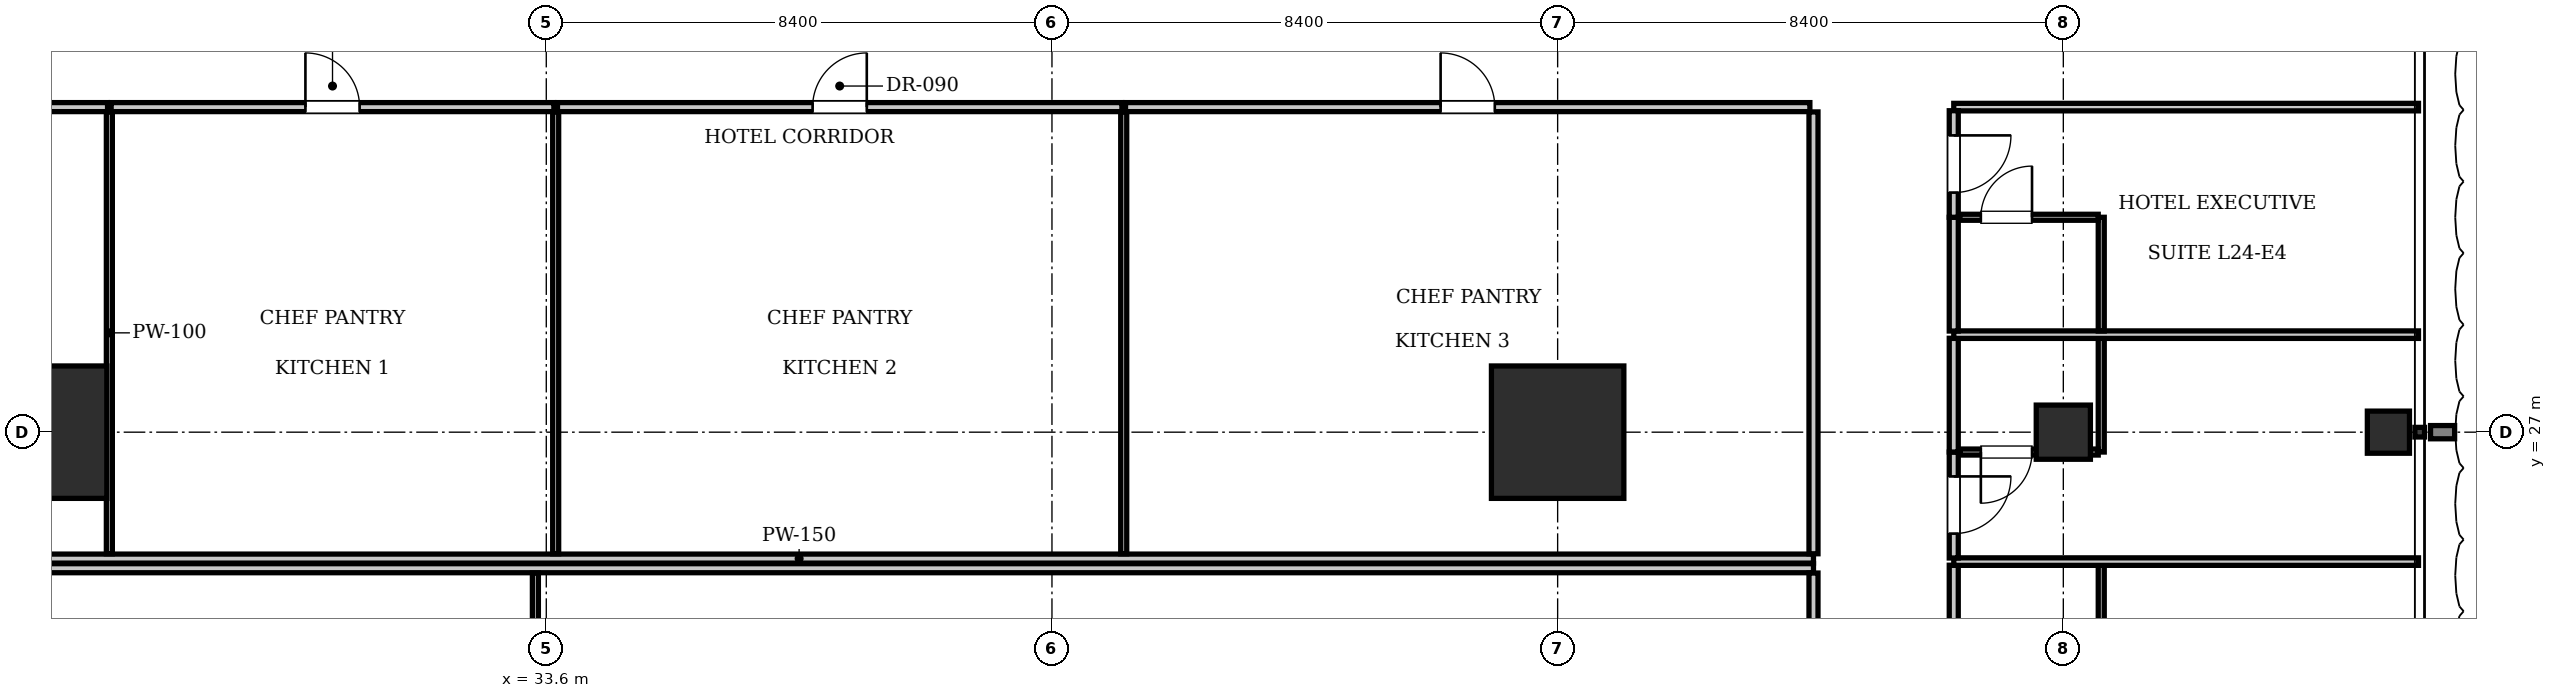
"""IFC4 building model, lengths in metres.
Left out: names, types, materials, properties, quantities, classifications, styles, units other than length and angle.
Written with IfcOpenShell. Run it as: python <this file> out.ifc"""

import sys

from ifc_helpers import new_model, si_unit, direction, frame, frame_2d, origin, origin_2d, place, context, subcontext, project, spatial, rectangle, i_section, extrude, element, fill, save


model = new_model("IFC4")
c1 = context("Model", 3, precision=1e-05, world=origin(), true_north=direction((0.0, 1.0)))
c2 = subcontext(c1, "Body", "Model", "MODEL_VIEW")
j1 = project(units=[si_unit("LENGTHUNIT", "METRE"), si_unit("PLANEANGLEUNIT", "RADIAN")], contexts=[c1])
p1 = place(None, origin())
s1 = spatial("IfcSite", under=j1, at=p1, CompositionType="ELEMENT")
p2 = place(p1, origin())
s2 = spatial("IfcBuilding", under=s1, at=p2, CompositionType="ELEMENT")
p3 = place(p2, frame((0.0, 0.0, 100.1)))
s3 = spatial("IfcBuildingStorey", under=s2, at=p3, CompositionType="ELEMENT", Elevation=100.1)
for number, where, z_axis, x_axis in (
    (1, (25.2, 27.0, 0.0), (0.0, 0.0, 1.0), (1.0, 0.0, 0.0)),
    (2, (50.4, 27.0, 0.0), (0.0, 0.0, 1.0), (1.0, 0.0, 0.0)),
):
    element("IfcColumn", number, at=place(p3, frame(where, z_axis=z_axis, x_axis=x_axis)), inside=s3, PredefinedType="COLUMN", context=c2, shape_type="SweptSolid", body=[
        extrude(rectangle(XDim=2.2, YDim=2.2, at=origin_2d()), origin(), (0.0, 0.0, 1.0), 3.85),
    ])
p4 = place(p3, frame((58.8, 27.0, 0.0), z_axis=(0.0, 0.0, 1.0), x_axis=(1.0, 0.0, 0.0)))
e3 = element("IfcColumn", 3, at=p4, inside=s3, PredefinedType="COLUMN", context=c2, shape_type="SweptSolid", body=[
    extrude(rectangle(XDim=0.9, YDim=0.9, at=origin_2d()), origin(), (0.0, 0.0, 1.0), 3.85),
])
p5 = place(p3, frame((64.2, 27.0, 0.0), z_axis=(0.0, 0.0, 1.0), x_axis=(1.0, 0.0, 0.0)))
e4 = element("IfcColumn", 4, at=p5, inside=s3, PredefinedType="COLUMN", context=c2, shape_type="SweptSolid", body=[
    extrude(i_section(OverallWidth=0.7, OverallDepth=0.7, WebThickness=0.028, FlangeThickness=0.044, at=origin_2d()), origin(), (0.0, 0.0, 1.0), 3.85),
])
p6 = place(p3, frame((20.95, 24.9, 0.0), z_axis=(0.0, 0.0, 1.0), x_axis=(1.0, 0.0, 0.0)))
e5 = element("IfcWall", 5, at=p6, inside=s3, PredefinedType="PARTITIONING", context=c2, shape_type="SweptSolid", body=[
    extrude(rectangle(XDim=33.7, YDim=0.15, at=frame_2d((16.85, 0.0))), origin(), (0.0, 0.0, 1.0), 3.61),
])
p7 = place(p3, frame((54.65, 24.98, 0.0), z_axis=(0.0, 0.0, 1.0), x_axis=(0.0, 1.0, 0.0)))
e6 = element("IfcWall", 6, at=p7, inside=s3, PredefinedType="PARTITIONING", context=c2, shape_type="SweptSolid", body=[
    extrude(rectangle(XDim=7.34, YDim=0.15, at=frame_2d((3.67, 0.0))), origin(), (0.0, 0.0, 1.0), 3.293),
])
p8 = place(p3, frame((21.01, 32.4, 0.0), z_axis=(0.0, 0.0, 1.0), x_axis=(1.0, 0.0, 0.0)))
e7 = element("IfcWall", 7, at=p8, inside=s3, PredefinedType="PARTITIONING", context=c2, shape_type="SweptSolid", body=[
    extrude(rectangle(XDim=5.302, YDim=0.15, at=frame_2d((2.651, 0.0))), origin(), (0.0, 0.0, 1.0), 3.61),
])
p9 = place(p8, frame((2.201, 0.0, 0.0)))
e8 = element("IfcOpeningElement", 8, at=p9, cuts=e7, PredefinedType="OPENING", context=c2, shape_type="SweptSolid", body=[
    extrude(rectangle(XDim=0.9, YDim=2.1, at=frame_2d((0.45, 1.05))), frame((0.0, 0.085, 0.0), z_axis=(0.0, -1.0, 0.0), x_axis=(1.0, 0.0, 0.0)), (0.0, 0.0, 1.0), 0.17),
])
p10 = place(p3, frame((26.342, 24.98, 0.0), z_axis=(0.0, 0.0, 1.0), x_axis=(0.0, 1.0, 0.0)))
e9 = element("IfcWall", 9, at=p10, inside=s3, PredefinedType="PARTITIONING", context=c2, shape_type="SweptSolid", body=[
    extrude(rectangle(XDim=7.34, YDim=0.1, at=frame_2d((3.67, 0.0))), origin(), (0.0, 0.0, 1.0), 3.61),
])
p11 = place(p3, frame((26.372, 32.4, 0.0), z_axis=(0.0, 0.0, 1.0), x_axis=(1.0, 0.0, 0.0)))
e10 = element("IfcWall", 10, at=p11, inside=s3, PredefinedType="PARTITIONING", context=c2, shape_type="SweptSolid", body=[
    extrude(rectangle(XDim=7.354, YDim=0.15, at=frame_2d((3.677, 0.0))), origin(), (0.0, 0.0, 1.0), 3.61),
])
p12 = place(p11, frame((3.227, 0.0, 0.0)))
e11 = element("IfcOpeningElement", 11, at=p12, cuts=e10, PredefinedType="OPENING", context=c2, shape_type="SweptSolid", body=[
    extrude(rectangle(XDim=0.9, YDim=2.1, at=frame_2d((0.45, 1.05))), frame((0.0, 0.085, 0.0), z_axis=(0.0, -1.0, 0.0), x_axis=(1.0, 0.0, 0.0)), (0.0, 0.0, 1.0), 0.17),
])
p13 = place(p3, frame((33.756, 24.98, 0.0), z_axis=(0.0, 0.0, 1.0), x_axis=(0.0, 1.0, 0.0)))
e12 = element("IfcWall", 12, at=p13, inside=s3, PredefinedType="PARTITIONING", context=c2, shape_type="SweptSolid", body=[
    extrude(rectangle(XDim=7.34, YDim=0.1, at=frame_2d((3.67, 0.0))), origin(), (0.0, 0.0, 1.0), 2.999),
])
p14 = place(p3, frame((33.786, 32.4, 0.0), z_axis=(0.0, 0.0, 1.0), x_axis=(1.0, 0.0, 0.0)))
e13 = element("IfcWall", 13, at=p14, inside=s3, PredefinedType="PARTITIONING", context=c2, shape_type="SweptSolid", body=[
    extrude(rectangle(XDim=9.376, YDim=0.15, at=frame_2d((4.688, 0.0))), origin(), (0.0, 0.0, 1.0), 3.61),
])
p15 = place(p14, frame((4.238, 0.0, 0.0)))
e14 = element("IfcOpeningElement", 14, at=p15, cuts=e13, PredefinedType="OPENING", context=c2, shape_type="SweptSolid", body=[
    extrude(rectangle(XDim=0.9, YDim=2.1, at=frame_2d((0.45, 1.05))), frame((0.0, 0.085, 0.0), z_axis=(0.0, -1.0, 0.0), x_axis=(1.0, 0.0, 0.0)), (0.0, 0.0, 1.0), 0.17),
])
p16 = place(p3, frame((43.192, 24.98, 0.0), z_axis=(0.0, 0.0, 1.0), x_axis=(0.0, 1.0, 0.0)))
e15 = element("IfcWall", 15, at=p16, inside=s3, PredefinedType="PARTITIONING", context=c2, shape_type="SweptSolid", body=[
    extrude(rectangle(XDim=7.34, YDim=0.1, at=frame_2d((3.67, 0.0))), origin(), (0.0, 0.0, 1.0), 3.61),
])
p17 = place(p3, frame((43.222, 32.4, 0.0), z_axis=(0.0, 0.0, 1.0), x_axis=(1.0, 0.0, 0.0)))
e16 = element("IfcWall", 16, at=p17, inside=s3, PredefinedType="PARTITIONING", context=c2, shape_type="SweptSolid", body=[
    extrude(rectangle(XDim=11.368, YDim=0.15, at=frame_2d((5.684, 0.0))), origin(), (0.0, 0.0, 1.0), 3.61),
])
p18 = place(p17, frame((5.234, 0.0, 0.0)))
e17 = element("IfcOpeningElement", 17, at=p18, cuts=e16, PredefinedType="OPENING", context=c2, shape_type="SweptSolid", body=[
    extrude(rectangle(XDim=0.9, YDim=2.1, at=frame_2d((0.45, 1.05))), frame((0.0, 0.085, 0.0), z_axis=(0.0, -1.0, 0.0), x_axis=(1.0, 0.0, 0.0)), (0.0, 0.0, 1.0), 0.17),
])
p19 = place(p3, frame((20.95, 24.74, 0.0), z_axis=(0.0, 0.0, 1.0), x_axis=(1.0, 0.0, 0.0)))
e18 = element("IfcWall", 18, at=p19, inside=s3, PredefinedType="PARTITIONING", context=c2, shape_type="SweptSolid", body=[
    extrude(rectangle(XDim=33.7, YDim=0.15, at=frame_2d((16.85, 0.0))), origin(), (0.0, 0.0, 1.0), 3.61),
])
p20 = place(p3, frame((54.65, 17.33, 0.0), z_axis=(0.0, 0.0, 1.0), x_axis=(0.0, 1.0, 0.0)))
e19 = element("IfcWall", 19, at=p20, inside=s3, PredefinedType="PARTITIONING", context=c2, shape_type="SweptSolid", body=[
    extrude(rectangle(XDim=7.33, YDim=0.15, at=frame_2d((3.665, 0.0))), origin(), (0.0, 0.0, 1.0), 3.255),
])
p21 = place(p3, frame((33.419, 17.33, 0.0), z_axis=(0.0, 0.0, 1.0), x_axis=(0.0, 1.0, 0.0)))
e20 = element("IfcWall", 20, at=p21, inside=s3, PredefinedType="PARTITIONING", context=c2, shape_type="SweptSolid", body=[
    extrude(rectangle(XDim=7.33, YDim=0.1, at=frame_2d((3.665, 0.0))), origin(), (0.0, 0.0, 1.0), 2.999),
])
p22 = place(p3, frame((56.98, 32.4, 0.0), z_axis=(0.0, 0.0, 1.0), x_axis=(1.0, 0.0, 0.0)))
e21 = element("IfcWall", 21, at=p22, inside=s3, PredefinedType="PARTITIONING", context=c2, shape_type="SweptSolid", body=[
    extrude(rectangle(XDim=7.72, YDim=0.125, at=frame_2d((3.86, 0.0))), origin(), (0.0, 0.0, 1.0), 3.61),
])
p23 = place(p3, frame((56.98, 22.9, 0.0), z_axis=(0.0, 0.0, 1.0), x_axis=(0.0, 1.0, 0.0)))
e22 = element("IfcWall", 22, at=p23, inside=s3, PredefinedType="PARTITIONING", context=c2, shape_type="SweptSolid", body=[
    extrude(rectangle(XDim=1.89, YDim=0.15, at=frame_2d((0.945, 0.0))), origin(), (0.0, 0.0, 1.0), 3.61),
])
p24 = place(p3, frame((59.43, 22.9, 0.0), z_axis=(0.0, 0.0, 1.0), x_axis=(0.0, 1.0, 0.0)))
e23 = element("IfcWall", 23, at=p24, inside=s3, PredefinedType="PARTITIONING", context=c2, shape_type="SweptSolid", body=[
    extrude(rectangle(XDim=1.89, YDim=0.1, at=frame_2d((0.945, 0.0))), origin(), (0.0, 0.0, 1.0), 3.61),
])
p25 = place(p3, frame((56.98, 24.85, 0.0), z_axis=(0.0, 0.0, 1.0), x_axis=(1.0, 0.0, 0.0)))
e24 = element("IfcWall", 24, at=p25, inside=s3, PredefinedType="PARTITIONING", context=c2, shape_type="SweptSolid", body=[
    extrude(rectangle(XDim=7.72, YDim=0.125, at=frame_2d((3.86, 0.0))), origin(), (0.0, 0.0, 1.0), 3.61),
])
p26 = place(p3, frame((56.98, 24.91, 0.0), z_axis=(0.0, 0.0, 1.0), x_axis=(0.0, 1.0, 0.0)))
e25 = element("IfcWall", 25, at=p26, inside=s3, PredefinedType="PARTITIONING", context=c2, shape_type="SweptSolid", body=[
    extrude(rectangle(XDim=1.76, YDim=0.15, at=frame_2d((0.88, 0.0))), origin(), (0.0, 0.0, 1.0), 3.61),
])
p27 = place(p26, frame((0.405, 0.0, 0.0)))
e26 = element("IfcOpeningElement", 26, at=p27, cuts=e25, PredefinedType="OPENING", context=c2, shape_type="SweptSolid", body=[
    extrude(rectangle(XDim=0.95, YDim=2.15, at=frame_2d((0.475, 1.075))), frame((0.0, 0.085, 0.0), z_axis=(0.0, -1.0, 0.0), x_axis=(1.0, 0.0, 0.0)), (0.0, 0.0, 1.0), 0.17),
])
p28 = place(p3, frame((56.98, 26.67, 0.0), z_axis=(0.0, 0.0, 1.0), x_axis=(0.0, 1.0, 0.0)))
e27 = element("IfcWall", 27, at=p28, inside=s3, PredefinedType="PARTITIONING", context=c2, shape_type="SweptSolid", body=[
    extrude(rectangle(XDim=1.89, YDim=0.15, at=frame_2d((0.945, 0.0))), origin(), (0.0, 0.0, 1.0), 3.61),
])
p29 = place(p3, frame((59.43, 26.67, 0.0), z_axis=(0.0, 0.0, 1.0), x_axis=(0.0, 1.0, 0.0)))
e28 = element("IfcWall", 28, at=p29, inside=s3, PredefinedType="PARTITIONING", context=c2, shape_type="SweptSolid", body=[
    extrude(rectangle(XDim=1.89, YDim=0.1, at=frame_2d((0.945, 0.0))), origin(), (0.0, 0.0, 1.0), 3.61),
])
p30 = place(p3, frame((57.08, 26.67, 0.0), z_axis=(0.0, 0.0, 1.0), x_axis=(1.0, 0.0, 0.0)))
e29 = element("IfcWall", 29, at=p30, inside=s3, PredefinedType="PARTITIONING", context=c2, shape_type="SweptSolid", body=[
    extrude(rectangle(XDim=2.3, YDim=0.1, at=frame_2d((1.15, 0.0))), origin(), (0.0, 0.0, 1.0), 3.61),
])
p31 = place(p30, frame((0.35, 0.0, 0.0)))
e30 = element("IfcOpeningElement", 30, at=p31, cuts=e29, PredefinedType="OPENING", context=c2, shape_type="SweptSolid", body=[
    extrude(rectangle(XDim=0.85, YDim=2.1, at=frame_2d((0.425, 1.05))), frame((0.0, 0.06, 0.0), z_axis=(0.0, -1.0, 0.0), x_axis=(1.0, 0.0, 0.0)), (0.0, 0.0, 1.0), 0.12),
])
p32 = place(p3, frame((56.98, 28.62, 0.0), z_axis=(0.0, 0.0, 1.0), x_axis=(1.0, 0.0, 0.0)))
e31 = element("IfcWall", 31, at=p32, inside=s3, PredefinedType="PARTITIONING", context=c2, shape_type="SweptSolid", body=[
    extrude(rectangle(XDim=7.72, YDim=0.125, at=frame_2d((3.86, 0.0))), origin(), (0.0, 0.0, 1.0), 3.61),
])
p33 = place(p3, frame((56.98, 28.68, 0.0), z_axis=(0.0, 0.0, 1.0), x_axis=(0.0, 1.0, 0.0)))
e32 = element("IfcWall", 32, at=p33, inside=s3, PredefinedType="PARTITIONING", context=c2, shape_type="SweptSolid", body=[
    extrude(rectangle(XDim=1.89, YDim=0.15, at=frame_2d((0.945, 0.0))), origin(), (0.0, 0.0, 1.0), 3.61),
])
p34 = place(p3, frame((56.98, 30.57, 0.0), z_axis=(0.0, 0.0, 1.0), x_axis=(0.0, 1.0, 0.0)))
e33 = element("IfcWall", 33, at=p34, inside=s3, PredefinedType="PARTITIONING", context=c2, shape_type="SweptSolid", body=[
    extrude(rectangle(XDim=1.77, YDim=0.15, at=frame_2d((0.885, 0.0))), origin(), (0.0, 0.0, 1.0), 3.61),
])
p35 = place(p34, frame((0.41, 0.0, 0.0)))
e34 = element("IfcOpeningElement", 34, at=p35, cuts=e33, PredefinedType="OPENING", context=c2, shape_type="SweptSolid", body=[
    extrude(rectangle(XDim=0.95, YDim=2.15, at=frame_2d((0.475, 1.075))), frame((0.0, 0.085, 0.0), z_axis=(0.0, -1.0, 0.0), x_axis=(1.0, 0.0, 0.0)), (0.0, 0.0, 1.0), 0.17),
])
p36 = place(p3, frame((59.43, 28.68, 0.0), z_axis=(0.0, 0.0, 1.0), x_axis=(0.0, 1.0, 0.0)))
e35 = element("IfcWall", 35, at=p36, inside=s3, PredefinedType="PARTITIONING", context=c2, shape_type="SweptSolid", body=[
    extrude(rectangle(XDim=1.89, YDim=0.1, at=frame_2d((0.945, 0.0))), origin(), (0.0, 0.0, 1.0), 3.61),
])
p37 = place(p3, frame((57.08, 30.57, 0.0), z_axis=(0.0, 0.0, 1.0), x_axis=(1.0, 0.0, 0.0)))
e36 = element("IfcWall", 36, at=p37, inside=s3, PredefinedType="PARTITIONING", context=c2, shape_type="SweptSolid", body=[
    extrude(rectangle(XDim=2.3, YDim=0.1, at=frame_2d((1.15, 0.0))), origin(), (0.0, 0.0, 1.0), 3.61),
])
p38 = place(p37, frame((0.35, 0.0, 0.0)))
e37 = element("IfcOpeningElement", 37, at=p38, cuts=e36, PredefinedType="OPENING", context=c2, shape_type="SweptSolid", body=[
    extrude(rectangle(XDim=0.85, YDim=2.1, at=frame_2d((0.425, 1.05))), frame((0.0, 0.06, 0.0), z_axis=(0.0, -1.0, 0.0), x_axis=(1.0, 0.0, 0.0)), (0.0, 0.0, 1.0), 0.12),
])
p39 = place(p12, origin())
e38 = element("IfcDoor", 38, at=p39, inside=s3, OperationType="SINGLE_SWING_LEFT", PredefinedType="DOOR", context=c2, shape_type="SweptSolid", body=[
    extrude(rectangle(XDim=0.9, YDim=2.1, at=frame_2d((0.45, 1.05))), frame((0.0, 0.025, 0.0), z_axis=(0.0, -1.0, 0.0), x_axis=(1.0, 0.0, 0.0)), (0.0, 0.0, 1.0), 0.05),
])
fill(e11, e38)
p40 = place(p15, origin())
e39 = element("IfcDoor", 39, at=p40, inside=s3, OperationType="SINGLE_SWING_RIGHT", PredefinedType="DOOR", context=c2, shape_type="SweptSolid", body=[
    extrude(rectangle(XDim=0.9, YDim=2.1, at=frame_2d((0.45, 1.05))), frame((0.0, 0.025, 0.0), z_axis=(0.0, -1.0, 0.0), x_axis=(1.0, 0.0, 0.0)), (0.0, 0.0, 1.0), 0.05),
])
fill(e14, e39)
p41 = place(p18, origin())
e40 = element("IfcDoor", 40, at=p41, inside=s3, OperationType="SINGLE_SWING_LEFT", PredefinedType="DOOR", context=c2, shape_type="SweptSolid", body=[
    extrude(rectangle(XDim=0.9, YDim=2.1, at=frame_2d((0.45, 1.05))), frame((0.0, 0.025, 0.0), z_axis=(0.0, -1.0, 0.0), x_axis=(1.0, 0.0, 0.0)), (0.0, 0.0, 1.0), 0.05),
])
fill(e17, e40)
p42 = place(p31, frame((0.85, 0.0, 0.0), z_axis=(0.0, 0.0, 1.0), x_axis=(-1.0, 0.0, 0.0)))
e41 = element("IfcDoor", 41, at=p42, inside=s3, OperationType="SINGLE_SWING_RIGHT", PredefinedType="DOOR", context=c2, shape_type="SweptSolid", body=[
    extrude(rectangle(XDim=0.85, YDim=2.1, at=frame_2d((0.425, 1.05))), frame((0.0, 0.025, 0.0), z_axis=(0.0, -1.0, 0.0), x_axis=(1.0, 0.0, 0.0)), (0.0, 0.0, 1.0), 0.05),
])
fill(e30, e41)
p43 = place(p27, frame((0.95, 0.0, 0.0), z_axis=(0.0, 0.0, 1.0), x_axis=(-1.0, 0.0, 0.0)))
e42 = element("IfcDoor", 42, at=p43, inside=s3, OperationType="SINGLE_SWING_LEFT", PredefinedType="DOOR", context=c2, shape_type="SweptSolid", body=[
    extrude(rectangle(XDim=0.95, YDim=2.15, at=frame_2d((0.475, 1.075))), frame((0.0, 0.025, 0.0), z_axis=(0.0, -1.0, 0.0), x_axis=(1.0, 0.0, 0.0)), (0.0, 0.0, 1.0), 0.05),
])
fill(e26, e42)
p44 = place(p38, origin())
e43 = element("IfcDoor", 43, at=p44, inside=s3, OperationType="SINGLE_SWING_RIGHT", PredefinedType="DOOR", context=c2, shape_type="SweptSolid", body=[
    extrude(rectangle(XDim=0.85, YDim=2.1, at=frame_2d((0.425, 1.05))), frame((0.0, 0.025, 0.0), z_axis=(0.0, -1.0, 0.0), x_axis=(1.0, 0.0, 0.0)), (0.0, 0.0, 1.0), 0.05),
])
fill(e37, e43)
p45 = place(p35, frame((0.95, 0.0, 0.0), z_axis=(0.0, 0.0, 1.0), x_axis=(-1.0, 0.0, 0.0)))
e44 = element("IfcDoor", 44, at=p45, inside=s3, OperationType="SINGLE_SWING_LEFT", PredefinedType="DOOR", context=c2, shape_type="SweptSolid", body=[
    extrude(rectangle(XDim=0.95, YDim=2.15, at=frame_2d((0.475, 1.075))), frame((0.0, 0.025, 0.0), z_axis=(0.0, -1.0, 0.0), x_axis=(1.0, 0.0, 0.0)), (0.0, 0.0, 1.0), 0.05),
])
fill(e34, e44)
save(model, sys.argv[1])
